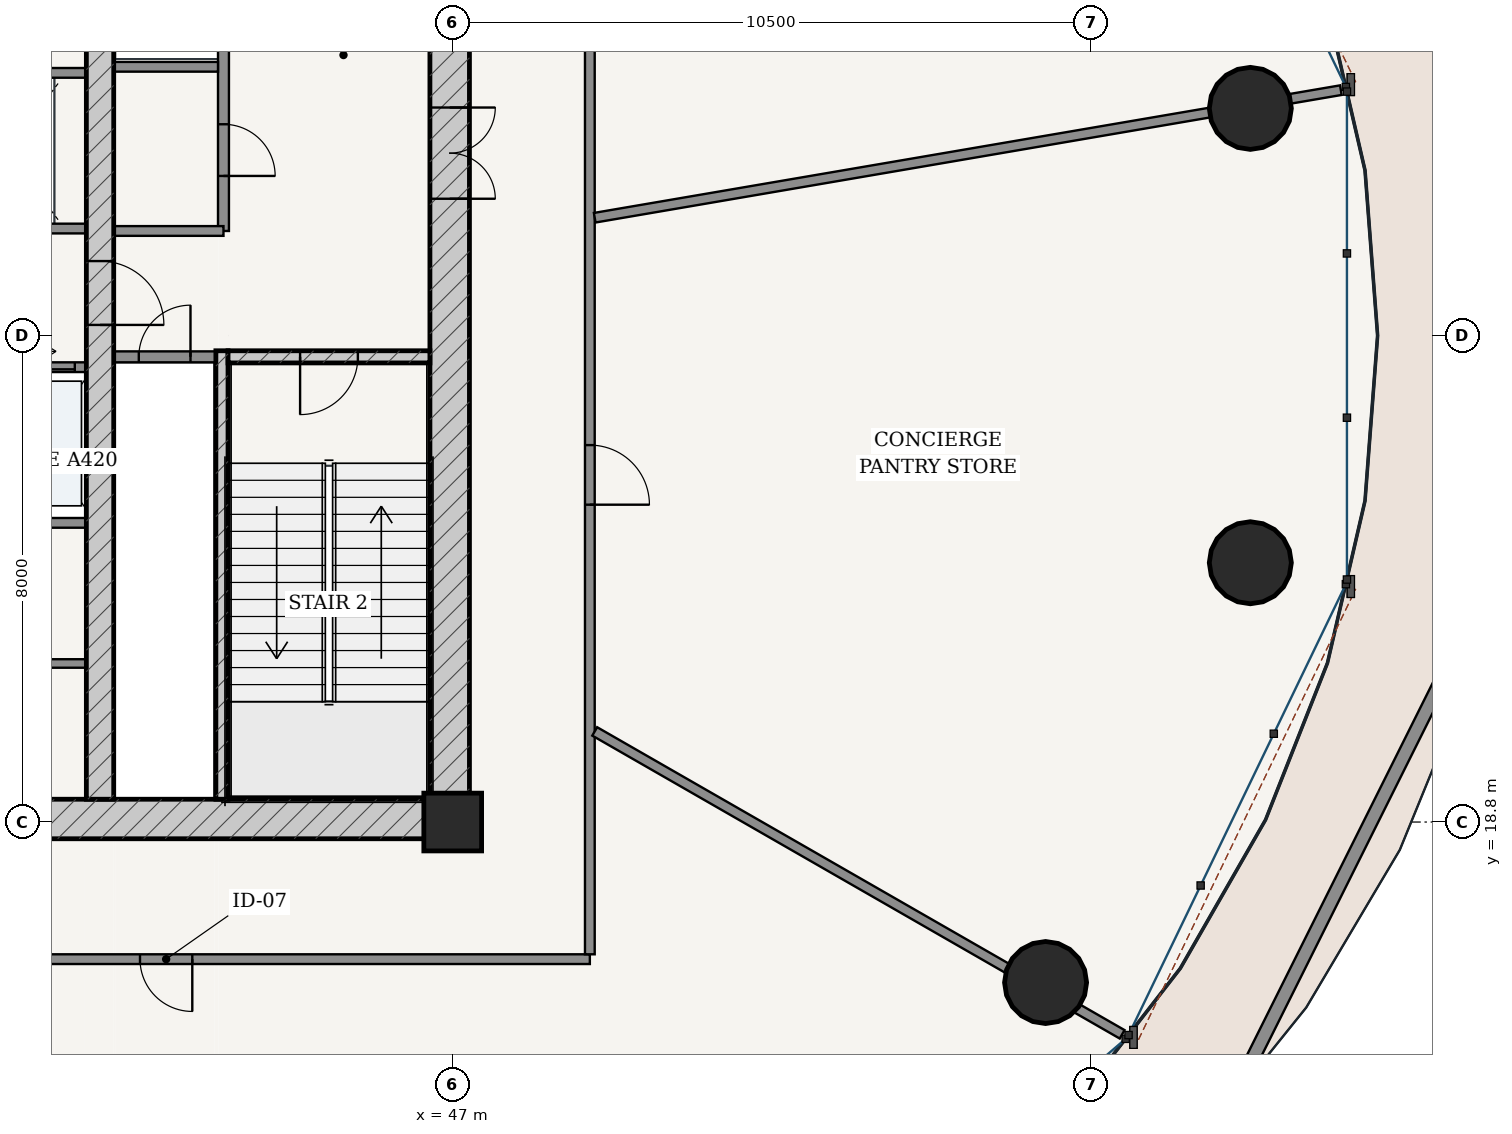
"""IFC4 building model, lengths in metres.
Left out: names, types, materials, properties, quantities, classifications, styles, units other than length and angle.
Written with IfcOpenShell. Run it as: python <this file> out.ifc"""

import sys

from ifc_helpers import new_model, si_unit, direction, frame, frame_2d, origin, origin_2d, place, context, subcontext, project, spatial, rectangle, hollow_circle, extrude, source, transform, mapped, element, fill, save


model = new_model("IFC4")
c1 = context("Model", 3, precision=1e-05, world=origin(), true_north=direction((-0.2419218956, 0.970295726276)))
c2 = subcontext(c1, "Body", "Model", "MODEL_VIEW")
j1 = project(units=[si_unit("LENGTHUNIT", "METRE"), si_unit("PLANEANGLEUNIT", "RADIAN")], contexts=[c1])
p1 = place(None, origin())
s1 = spatial("IfcSite", under=j1, at=p1, CompositionType="ELEMENT")
p2 = place(p1, origin())
s2 = spatial("IfcBuilding", under=s1, at=p2, CompositionType="ELEMENT")
p3 = place(p2, frame((0.0, 0.0, 130.2)))
s3 = spatial("IfcBuildingStorey", under=s2, at=p3, CompositionType="ELEMENT", Elevation=130.2)
p4 = place(p3, frame((47.0, 18.8, 0.0), z_axis=(0.0, 0.0, 1.0), x_axis=(1.0, 0.0, 0.0)))
e1 = element("IfcColumn", 1, at=p4, inside=s3, PredefinedType="COLUMN", context=c2, shape_type="SweptSolid", body=[
    extrude(rectangle(XDim=0.95, YDim=0.95, at=origin_2d()), origin(), (0.0, 0.0, 1.0), 5.2),
])
p5 = place(p3, frame((28.725, 18.85, 0.0), z_axis=(0.0, 0.0, 1.0), x_axis=(1.0, 0.0, 0.0)))
e2 = element("IfcWall", 2, at=p5, inside=s3, PredefinedType="SHEAR", context=c2, shape_type="SweptSolid", body=[
    extrude(rectangle(XDim=18.55, YDim=0.65, at=frame_2d((9.275, 0.0))), origin(), (0.0, 0.0, 1.0), 4.93),
])
p6 = place(p5, frame((7.528, 0.0, 0.0)))
e3 = element("IfcOpeningElement", 3, at=p6, cuts=e2, PredefinedType="OPENING", context=c2, shape_type="SweptSolid", body=[
    extrude(rectangle(XDim=0.85, YDim=2.1, at=frame_2d((0.425, 1.05))), frame((0.0, 0.335, 0.0), z_axis=(0.0, -1.0, 0.0), x_axis=(1.0, 0.0, 0.0)), (0.0, 0.0, 1.0), 0.67),
])
p7 = place(p5, frame((10.573, 0.0, 0.0)))
e4 = element("IfcOpeningElement", 4, at=p7, cuts=e2, PredefinedType="OPENING", context=c2, shape_type="SweptSolid", body=[
    extrude(rectangle(XDim=0.85, YDim=2.1, at=frame_2d((0.425, 1.05))), frame((0.0, 0.335, 0.0), z_axis=(0.0, -1.0, 0.0), x_axis=(1.0, 0.0, 0.0)), (0.0, 0.0, 1.0), 0.67),
])
p8 = place(p3, frame((46.95, 19.175, 0.0), z_axis=(0.0, 0.0, 1.0), x_axis=(0.0, 1.0, 0.0)))
e5 = element("IfcWall", 5, at=p8, inside=s3, PredefinedType="SHEAR", context=c2, shape_type="SweptSolid", body=[
    extrude(rectangle(XDim=15.25, YDim=0.65, at=frame_2d((7.625, 0.0))), origin(), (0.0, 0.0, 1.0), 4.93),
])
p9 = place(p8, frame((9.875, 0.0, 0.0)))
e6 = element("IfcOpeningElement", 6, at=p9, cuts=e5, PredefinedType="OPENING", context=c2, shape_type="SweptSolid", body=[
    extrude(rectangle(XDim=1.5, YDim=2.2, at=frame_2d((0.75, 1.1))), frame((0.0, 0.335, 0.0), z_axis=(0.0, -1.0, 0.0), x_axis=(1.0, 0.0, 0.0)), (0.0, 0.0, 1.0), 0.67),
])
p10 = place(p3, frame((43.205, 19.175, 0.0), z_axis=(0.0, 0.0, 1.0), x_axis=(0.0, 1.0, 0.0)))
e7 = element("IfcWall", 7, at=p10, inside=s3, PredefinedType="SOLIDWALL", context=c2, shape_type="SweptSolid", body=[
    extrude(rectangle(XDim=7.375, YDim=0.2, at=frame_2d((3.688, 0.0))), origin(), (0.0, 0.0, 1.0), 4.93),
])
p11 = place(p3, frame((43.305, 26.45, 0.0), z_axis=(0.0, 0.0, 1.0), x_axis=(1.0, 0.0, 0.0)))
e8 = element("IfcWall", 8, at=p11, inside=s3, PredefinedType="SOLIDWALL", context=c2, shape_type="SweptSolid", body=[
    extrude(rectangle(XDim=3.32, YDim=0.2, at=frame_2d((1.66, 0.0))), origin(), (0.0, 0.0, 1.0), 4.93),
])
p12 = place(p11, frame((1.185, 0.0, 0.0)))
e9 = element("IfcOpeningElement", 9, at=p12, cuts=e8, PredefinedType="OPENING", context=c2, shape_type="SweptSolid", body=[
    extrude(rectangle(XDim=0.95, YDim=2.15, at=frame_2d((0.475, 1.075))), frame((0.0, 0.11, 0.0), z_axis=(0.0, -1.0, 0.0), x_axis=(1.0, 0.0, 0.0)), (0.0, 0.0, 1.0), 0.22),
])
p13 = place(p3, frame((41.2, 19.175, 0.0), z_axis=(0.0, 0.0, 1.0), x_axis=(0.0, 1.0, 0.0)))
e10 = element("IfcWall", 10, at=p13, inside=s3, PredefinedType="SHEAR", context=c2, shape_type="SweptSolid", body=[
    extrude(rectangle(XDim=15.25, YDim=0.45, at=frame_2d((7.625, 0.0))), origin(), (0.0, 0.0, 1.0), 4.93),
])
p14 = place(p13, frame((7.8, 0.0, 0.0)))
e11 = element("IfcOpeningElement", 11, at=p14, cuts=e10, PredefinedType="OPENING", context=c2, shape_type="SweptSolid", body=[
    extrude(rectangle(XDim=1.05, YDim=2.15, at=frame_2d((0.525, 1.075))), frame((0.0, 0.235, 0.0), z_axis=(0.0, -1.0, 0.0), x_axis=(1.0, 0.0, 0.0)), (0.0, 0.0, 1.0), 0.47),
])
for number, where, z_axis, x_axis in (
    (12, (60.117, 30.536, 0.0), (0.0, 0.0, 1.0), (1.0, 0.0, 0.0)),
    (13, (56.75, 16.161, 0.0), (0.0, 0.0, 1.0), (1.0, 0.0, 0.0)),
    (14, (60.117, 23.064, 0.0), (0.0, 0.0, 1.0), (1.0, 0.0, 0.0)),
):
    element("IfcColumn", number, at=place(p3, frame(where, z_axis=z_axis, x_axis=x_axis)), inside=s3, PredefinedType="COLUMN", context=c2, shape_type="SweptSolid", body=[
        extrude(hollow_circle(Radius=0.675, WallThickness=0.042, at=origin_2d()), origin(), (0.0, 0.0, 1.0), 5.2),
    ])
p15 = place(p3, frame((63.952, 31.084, 0.0), z_axis=(0.0, 0.0, 1.0), x_axis=(-0.446573272083, 0.894747066305, 0.0)))
e15 = element("IfcWall", 15, at=p15, inside=s3, PredefinedType="PARAPET", context=c2, shape_type="SweptSolid", body=[
    extrude(rectangle(XDim=8.847, YDim=0.22, at=frame_2d((4.424, 0.0))), origin(), (0.0, 0.0, 1.0), 1.15),
])
p16 = place(p3, frame((60.001, 14.6, 0.0), z_axis=(0.0, 0.0, 1.0), x_axis=(0.4465622461, 0.89475256935, 0.0)))
e16 = element("IfcWall", 16, at=p16, inside=s3, PredefinedType="PARAPET", context=c2, shape_type="SweptSolid", body=[
    extrude(rectangle(XDim=8.847, YDim=0.22, at=frame_2d((4.424, 0.0))), origin(), (0.0, 0.0, 1.0), 1.15),
])
p17 = place(p3, frame((41.425, 26.45, 0.0), z_axis=(0.0, 0.0, 1.0), x_axis=(1.0, 0.0, 0.0)))
e17 = element("IfcWall", 17, at=p17, inside=s3, PredefinedType="PARTITIONING", context=c2, shape_type="SweptSolid", body=[
    extrude(rectangle(XDim=1.675, YDim=0.18, at=frame_2d((0.837, 0.0))), origin(), (0.0, 0.0, 1.0), 4.93),
])
p18 = place(p17, frame((0.413, 0.0, 0.0)))
e18 = element("IfcOpeningElement", 18, at=p18, cuts=e17, PredefinedType="OPENING", context=c2, shape_type="SweptSolid", body=[
    extrude(rectangle(XDim=0.85, YDim=2.1, at=frame_2d((0.425, 1.05))), frame((0.0, 0.1, 0.0), z_axis=(0.0, -1.0, 0.0), x_axis=(1.0, 0.0, 0.0)), (0.0, 0.0, 1.0), 0.2),
])
p19 = place(p3, frame((43.23, 28.52, 0.0), z_axis=(0.0, 0.0, 1.0), x_axis=(0.0, 1.0, 0.0)))
e19 = element("IfcWall", 19, at=p19, inside=s3, PredefinedType="PARTITIONING", context=c2, shape_type="SweptSolid", body=[
    extrude(rectangle(XDim=5.905, YDim=0.18, at=frame_2d((2.953, 0.0))), origin(), (0.0, 0.0, 1.0), 4.93),
])
p20 = place(p19, frame((0.905, 0.0, 0.0)))
e20 = element("IfcOpeningElement", 20, at=p20, cuts=e19, PredefinedType="OPENING", context=c2, shape_type="SweptSolid", body=[
    extrude(rectangle(XDim=0.85, YDim=2.1, at=frame_2d((0.425, 1.05))), frame((0.0, 0.1, 0.0), z_axis=(0.0, -1.0, 0.0), x_axis=(1.0, 0.0, 0.0)), (0.0, 0.0, 1.0), 0.2),
])
p21 = place(p19, frame((3.655, 0.0, 0.0)))
e21 = element("IfcOpeningElement", 21, at=p21, cuts=e19, PredefinedType="OPENING", context=c2, shape_type="SweptSolid", body=[
    extrude(rectangle(XDim=1.15, YDim=2.2, at=frame_2d((0.575, 1.1))), frame((0.0, 0.1, 0.0), z_axis=(0.0, -1.0, 0.0), x_axis=(1.0, 0.0, 0.0)), (0.0, 0.0, 1.0), 0.2),
])
p22 = place(p3, frame((41.425, 31.22, 0.0), z_axis=(0.0, 0.0, 1.0), x_axis=(1.0, 0.0, 0.0)))
e22 = element("IfcWall", 22, at=p22, inside=s3, PredefinedType="PARTITIONING", context=c2, shape_type="SweptSolid", body=[
    extrude(rectangle(XDim=1.715, YDim=0.16, at=frame_2d((0.857, 0.0))), origin(), (0.0, 0.0, 1.0), 4.93),
])
p23 = place(p3, frame((41.425, 28.52, 0.0), z_axis=(0.0, 0.0, 1.0), x_axis=(1.0, 0.0, 0.0)))
e23 = element("IfcWall", 23, at=p23, inside=s3, PredefinedType="PARTITIONING", context=c2, shape_type="SweptSolid", body=[
    extrude(rectangle(XDim=1.805, YDim=0.16, at=frame_2d((0.902, 0.0))), origin(), (0.0, 0.0, 1.0), 4.93),
])
p24 = place(p3, frame((35.025, 28.56, 0.0), z_axis=(0.0, 0.0, 1.0), x_axis=(1.0, 0.0, 0.0)))
e24 = element("IfcWall", 24, at=p24, inside=s3, PredefinedType="PARTITIONING", context=c2, shape_type="SweptSolid", body=[
    extrude(rectangle(XDim=5.95, YDim=0.16, at=frame_2d((2.975, 0.0))), origin(), (0.0, 0.0, 1.0), 4.93),
])
p25 = place(p24, frame((0.76, 0.0, 0.0)))
e25 = element("IfcOpeningElement", 25, at=p25, cuts=e24, PredefinedType="OPENING", context=c2, shape_type="SweptSolid", body=[
    extrude(rectangle(XDim=1.1, YDim=2.2, at=frame_2d((0.55, 1.1))), frame((0.0, 0.09, 0.0), z_axis=(0.0, -1.0, 0.0), x_axis=(1.0, 0.0, 0.0)), (0.0, 0.0, 1.0), 0.18),
])
p26 = place(p24, frame((2.425, 0.0, 0.0)))
e26 = element("IfcOpeningElement", 26, at=p26, cuts=e24, PredefinedType="OPENING", context=c2, shape_type="SweptSolid", body=[
    extrude(rectangle(XDim=1.1, YDim=2.2, at=frame_2d((0.55, 1.1))), frame((0.0, 0.09, 0.0), z_axis=(0.0, -1.0, 0.0), x_axis=(1.0, 0.0, 0.0)), (0.0, 0.0, 1.0), 0.18),
])
p27 = place(p24, frame((4.09, 0.0, 0.0)))
e27 = element("IfcOpeningElement", 27, at=p27, cuts=e24, PredefinedType="OPENING", context=c2, shape_type="SweptSolid", body=[
    extrude(rectangle(XDim=1.1, YDim=2.2, at=frame_2d((0.55, 1.1))), frame((0.0, 0.09, 0.0), z_axis=(0.0, -1.0, 0.0), x_axis=(1.0, 0.0, 0.0)), (0.0, 0.0, 1.0), 0.18),
])
p28 = place(p3, frame((35.025, 31.12, 0.0), z_axis=(0.0, 0.0, 1.0), x_axis=(1.0, 0.0, 0.0)))
e28 = element("IfcWall", 28, at=p28, inside=s3, PredefinedType="PARTITIONING", context=c2, shape_type="SweptSolid", body=[
    extrude(rectangle(XDim=5.95, YDim=0.16, at=frame_2d((2.975, 0.0))), origin(), (0.0, 0.0, 1.0), 4.93),
])
p29 = place(p3, frame((35.025, 26.28, 0.0), z_axis=(0.0, 0.0, 1.0), x_axis=(1.0, 0.0, 0.0)))
e29 = element("IfcWall", 29, at=p29, inside=s3, PredefinedType="PARTITIONING", context=c2, shape_type="SweptSolid", body=[
    extrude(rectangle(XDim=5.95, YDim=0.16, at=frame_2d((2.975, 0.0))), origin(), (0.0, 0.0, 1.0), 4.93),
])
p30 = place(p29, frame((0.19, 0.0, 0.0)))
e30 = element("IfcOpeningElement", 30, at=p30, cuts=e29, PredefinedType="OPENING", context=c2, shape_type="SweptSolid", body=[
    extrude(rectangle(XDim=1.1, YDim=2.2, at=frame_2d((0.55, 1.1))), frame((0.0, 0.09, 0.0), z_axis=(0.0, -1.0, 0.0), x_axis=(1.0, 0.0, 0.0)), (0.0, 0.0, 1.0), 0.18),
])
p31 = place(p29, frame((1.67, 0.0, 0.0)))
e31 = element("IfcOpeningElement", 31, at=p31, cuts=e29, PredefinedType="OPENING", context=c2, shape_type="SweptSolid", body=[
    extrude(rectangle(XDim=1.1, YDim=2.2, at=frame_2d((0.55, 1.1))), frame((0.0, 0.09, 0.0), z_axis=(0.0, -1.0, 0.0), x_axis=(1.0, 0.0, 0.0)), (0.0, 0.0, 1.0), 0.18),
])
p32 = place(p29, frame((3.18, 0.0, 0.0)))
e32 = element("IfcOpeningElement", 32, at=p32, cuts=e29, PredefinedType="OPENING", context=c2, shape_type="SweptSolid", body=[
    extrude(rectangle(XDim=1.1, YDim=2.2, at=frame_2d((0.55, 1.1))), frame((0.0, 0.09, 0.0), z_axis=(0.0, -1.0, 0.0), x_axis=(1.0, 0.0, 0.0)), (0.0, 0.0, 1.0), 0.18),
])
p33 = place(p29, frame((4.66, 0.0, 0.0)))
e33 = element("IfcOpeningElement", 33, at=p33, cuts=e29, PredefinedType="OPENING", context=c2, shape_type="SweptSolid", body=[
    extrude(rectangle(XDim=1.1, YDim=2.2, at=frame_2d((0.55, 1.1))), frame((0.0, 0.09, 0.0), z_axis=(0.0, -1.0, 0.0), x_axis=(1.0, 0.0, 0.0)), (0.0, 0.0, 1.0), 0.18),
])
p34 = place(p3, frame((35.025, 23.72, 0.0), z_axis=(0.0, 0.0, 1.0), x_axis=(1.0, 0.0, 0.0)))
e34 = element("IfcWall", 34, at=p34, inside=s3, PredefinedType="PARTITIONING", context=c2, shape_type="SweptSolid", body=[
    extrude(rectangle(XDim=5.95, YDim=0.16, at=frame_2d((2.975, 0.0))), origin(), (0.0, 0.0, 1.0), 4.93),
])
p35 = place(p3, frame((38.4, 21.407, 0.0), z_axis=(0.0, 0.0, 1.0), x_axis=(1.0, 0.0, 0.0)))
e35 = element("IfcWall", 35, at=p35, inside=s3, PredefinedType="PARTITIONING", context=c2, shape_type="SweptSolid", body=[
    extrude(rectangle(XDim=2.575, YDim=0.14, at=frame_2d((1.288, 0.0))), origin(), (0.0, 0.0, 1.0), 4.93),
])
p36 = place(p35, frame((0.863, 0.0, 0.0)))
e36 = element("IfcOpeningElement", 36, at=p36, cuts=e35, PredefinedType="OPENING", context=c2, shape_type="SweptSolid", body=[
    extrude(rectangle(XDim=0.85, YDim=2.1, at=frame_2d((0.425, 1.05))), frame((0.0, 0.08, 0.0), z_axis=(0.0, -1.0, 0.0), x_axis=(1.0, 0.0, 0.0)), (0.0, 0.0, 1.0), 0.16),
])
p37 = place(p3, frame((26.745, 16.545, 0.0), z_axis=(0.0, 0.0, 1.0), x_axis=(1.0, 0.0, 0.0)))
e37 = element("IfcWall", 37, at=p37, inside=s3, PredefinedType="PARTITIONING", context=c2, shape_type="SweptSolid", body=[
    extrude(rectangle(XDim=22.51, YDim=0.16, at=frame_2d((11.255, 0.0))), origin(), (0.0, 0.0, 1.0), 4.376),
])
p38 = place(p37, frame((4.086, 0.0, 0.0)))
e38 = element("IfcOpeningElement", 38, at=p38, cuts=e37, PredefinedType="OPENING", context=c2, shape_type="SweptSolid", body=[
    extrude(rectangle(XDim=0.98, YDim=2.2, at=frame_2d((0.49, 1.1))), frame((0.0, 0.09, 0.0), z_axis=(0.0, -1.0, 0.0), x_axis=(1.0, 0.0, 0.0)), (0.0, 0.0, 1.0), 0.18),
])
p39 = place(p37, frame((15.112, 0.0, 0.0)))
e39 = element("IfcOpeningElement", 39, at=p39, cuts=e37, PredefinedType="OPENING", context=c2, shape_type="SweptSolid", body=[
    extrude(rectangle(XDim=0.86, YDim=2.1, at=frame_2d((0.43, 1.05))), frame((0.0, 0.09, 0.0), z_axis=(0.0, -1.0, 0.0), x_axis=(1.0, 0.0, 0.0)), (0.0, 0.0, 1.0), 0.18),
])
p40 = place(p3, frame((49.255, 16.625, 0.0), z_axis=(0.0, 0.0, 1.0), x_axis=(0.0, 1.0, 0.0)))
e40 = element("IfcWall", 40, at=p40, inside=s3, PredefinedType="PARTITIONING", context=c2, shape_type="SweptSolid", body=[
    extrude(rectangle(XDim=20.35, YDim=0.16, at=frame_2d((10.175, 0.0))), origin(), (0.0, 0.0, 1.0), 4.376),
])
p41 = place(p40, frame((7.394, 0.0, 0.0)))
e41 = element("IfcOpeningElement", 41, at=p41, cuts=e40, PredefinedType="OPENING", context=c2, shape_type="SweptSolid", body=[
    extrude(rectangle(XDim=0.98, YDim=2.2, at=frame_2d((0.49, 1.1))), frame((0.0, 0.09, 0.0), z_axis=(0.0, -1.0, 0.0), x_axis=(1.0, 0.0, 0.0)), (0.0, 0.0, 1.0), 0.18),
])
p42 = place(p3, frame((49.335, 28.738, 0.0), z_axis=(0.0, 0.0, 1.0), x_axis=(0.985697276978, 0.168525600897, 0.0)))
e42 = element("IfcWall", 42, at=p42, inside=s3, PredefinedType="PARTITIONING", context=c2, shape_type="SweptSolid", body=[
    extrude(rectangle(XDim=12.448, YDim=0.16, at=frame_2d((6.224, 0.0))), origin(), (0.0, 0.0, 1.0), 4.376),
])
p43 = place(p3, frame((49.335, 20.29, 0.0), z_axis=(0.0, 0.0, 1.0), x_axis=(0.867165650495, -0.498019813463, 0.0)))
e43 = element("IfcWall", 43, at=p43, inside=s3, PredefinedType="PARTITIONING", context=c2, shape_type="SweptSolid", body=[
    extrude(rectangle(XDim=10.002, YDim=0.16, at=frame_2d((5.001, 0.0))), origin(), (0.0, 0.0, 1.0), 4.376),
])
m1 = source(origin(), c2, "Body", "SweptSolid", [
    extrude(rectangle(XDim=1.5, YDim=2.2, at=frame_2d((0.75, 1.1))), frame((0.0, 0.025, 0.0), z_axis=(0.0, -1.0, 0.0), x_axis=(1.0, 0.0, 0.0)), (0.0, 0.0, 1.0), 0.05),
])
p44 = place(p9, frame((1.5, 0.0, 0.0), z_axis=(0.0, 0.0, 1.0), x_axis=(-1.0, 0.0, 0.0)))
e44 = element("IfcDoor", 44, at=p44, inside=s3, OperationType="DOUBLE_DOOR_SINGLE_SWING", PredefinedType="DOOR", context=c2, shape_type="MappedRepresentation", body=[
    mapped(m1, transform((0.0, 0.0, 0.0), scale=1.0)),
])
fill(e6, e44)
m2 = source(origin(), c2, "Body", "SweptSolid", [
    extrude(rectangle(XDim=1.05, YDim=2.15, at=frame_2d((0.525, 1.075))), frame((0.0, 0.025, 0.0), z_axis=(0.0, -1.0, 0.0), x_axis=(1.0, 0.0, 0.0)), (0.0, 0.0, 1.0), 0.05),
])
p45 = place(p14, frame((1.05, 0.0, 0.0), z_axis=(0.0, 0.0, 1.0), x_axis=(-1.0, 0.0, 0.0)))
e45 = element("IfcDoor", 45, at=p45, inside=s3, OperationType="SINGLE_SWING_RIGHT", PredefinedType="DOOR", context=c2, shape_type="MappedRepresentation", body=[
    mapped(m2, transform((0.0, 0.0, 0.0), scale=1.0)),
])
fill(e11, e45)
m3 = source(origin(), c2, "Body", "SweptSolid", [
    extrude(rectangle(XDim=0.95, YDim=2.15, at=frame_2d((0.475, 1.075))), frame((0.0, 0.025, 0.0), z_axis=(0.0, -1.0, 0.0), x_axis=(1.0, 0.0, 0.0)), (0.0, 0.0, 1.0), 0.05),
])
p46 = place(p12, frame((0.95, 0.0, 0.0), z_axis=(0.0, 0.0, 1.0), x_axis=(-1.0, 0.0, 0.0)))
e46 = element("IfcDoor", 46, at=p46, inside=s3, OperationType="SINGLE_SWING_RIGHT", PredefinedType="DOOR", context=c2, shape_type="MappedRepresentation", body=[
    mapped(m3, transform((0.0, 0.0, 0.0), scale=1.0)),
])
fill(e9, e46)
m4 = source(origin(), c2, "Body", "SweptSolid", [
    extrude(rectangle(XDim=0.85, YDim=2.1, at=frame_2d((0.425, 1.05))), frame((0.0, 0.025, 0.0), z_axis=(0.0, -1.0, 0.0), x_axis=(1.0, 0.0, 0.0)), (0.0, 0.0, 1.0), 0.05),
])
p47 = place(p18, origin())
e47 = element("IfcDoor", 47, at=p47, inside=s3, OperationType="SINGLE_SWING_RIGHT", PredefinedType="DOOR", context=c2, shape_type="MappedRepresentation", body=[
    mapped(m4, transform((0.0, 0.0, 0.0), scale=1.0)),
])
fill(e18, e47)
p48 = place(p20, frame((0.85, 0.0, 0.0), z_axis=(0.0, 0.0, 1.0), x_axis=(-1.0, 0.0, 0.0)))
e48 = element("IfcDoor", 48, at=p48, inside=s3, OperationType="SINGLE_SWING_RIGHT", PredefinedType="DOOR", context=c2, shape_type="MappedRepresentation", body=[
    mapped(m4, transform((0.0, 0.0, 0.0), scale=1.0)),
])
fill(e20, e48)
m5 = source(origin(), c2, "Body", "SweptSolid", [
    extrude(rectangle(XDim=1.1, YDim=2.2, at=frame_2d((0.55, 1.1))), frame((0.0, 0.025, 0.0), z_axis=(0.0, -1.0, 0.0), x_axis=(1.0, 0.0, 0.0)), (0.0, 0.0, 1.0), 0.05),
])
p49 = place(p33, origin())
e49 = element("IfcDoor", 49, at=p49, inside=s3, OperationType="DOUBLE_DOOR_SLIDING", PredefinedType="DOOR", context=c2, shape_type="MappedRepresentation", body=[
    mapped(m5, transform((0.0, 0.0, 0.0), scale=1.0)),
])
fill(e33, e49)
m6 = source(origin(), c2, "Body", "SweptSolid", [
    extrude(rectangle(XDim=0.86, YDim=2.1, at=frame_2d((0.43, 1.05))), frame((0.0, 0.025, 0.0), z_axis=(0.0, -1.0, 0.0), x_axis=(1.0, 0.0, 0.0)), (0.0, 0.0, 1.0), 0.05),
])
p50 = place(p39, frame((0.86, 0.0, 0.0), z_axis=(0.0, 0.0, 1.0), x_axis=(-1.0, 0.0, 0.0)))
e50 = element("IfcDoor", 50, at=p50, inside=s3, OperationType="SINGLE_SWING_LEFT", PredefinedType="DOOR", context=c2, shape_type="MappedRepresentation", body=[
    mapped(m6, transform((0.0, 0.0, 0.0), scale=1.0)),
])
fill(e39, e50)
m7 = source(origin(), c2, "Body", "SweptSolid", [
    extrude(rectangle(XDim=0.98, YDim=2.2, at=frame_2d((0.49, 1.1))), frame((0.0, 0.025, 0.0), z_axis=(0.0, -1.0, 0.0), x_axis=(1.0, 0.0, 0.0)), (0.0, 0.0, 1.0), 0.05),
])
p51 = place(p41, frame((0.98, 0.0, 0.0), z_axis=(0.0, 0.0, 1.0), x_axis=(-1.0, 0.0, 0.0)))
e51 = element("IfcDoor", 51, at=p51, inside=s3, OperationType="SINGLE_SWING_RIGHT", PredefinedType="DOOR", context=c2, shape_type="MappedRepresentation", body=[
    mapped(m7, transform((0.0, 0.0, 0.0), scale=1.0)),
])
fill(e41, e51)
save(model, sys.argv[1])
